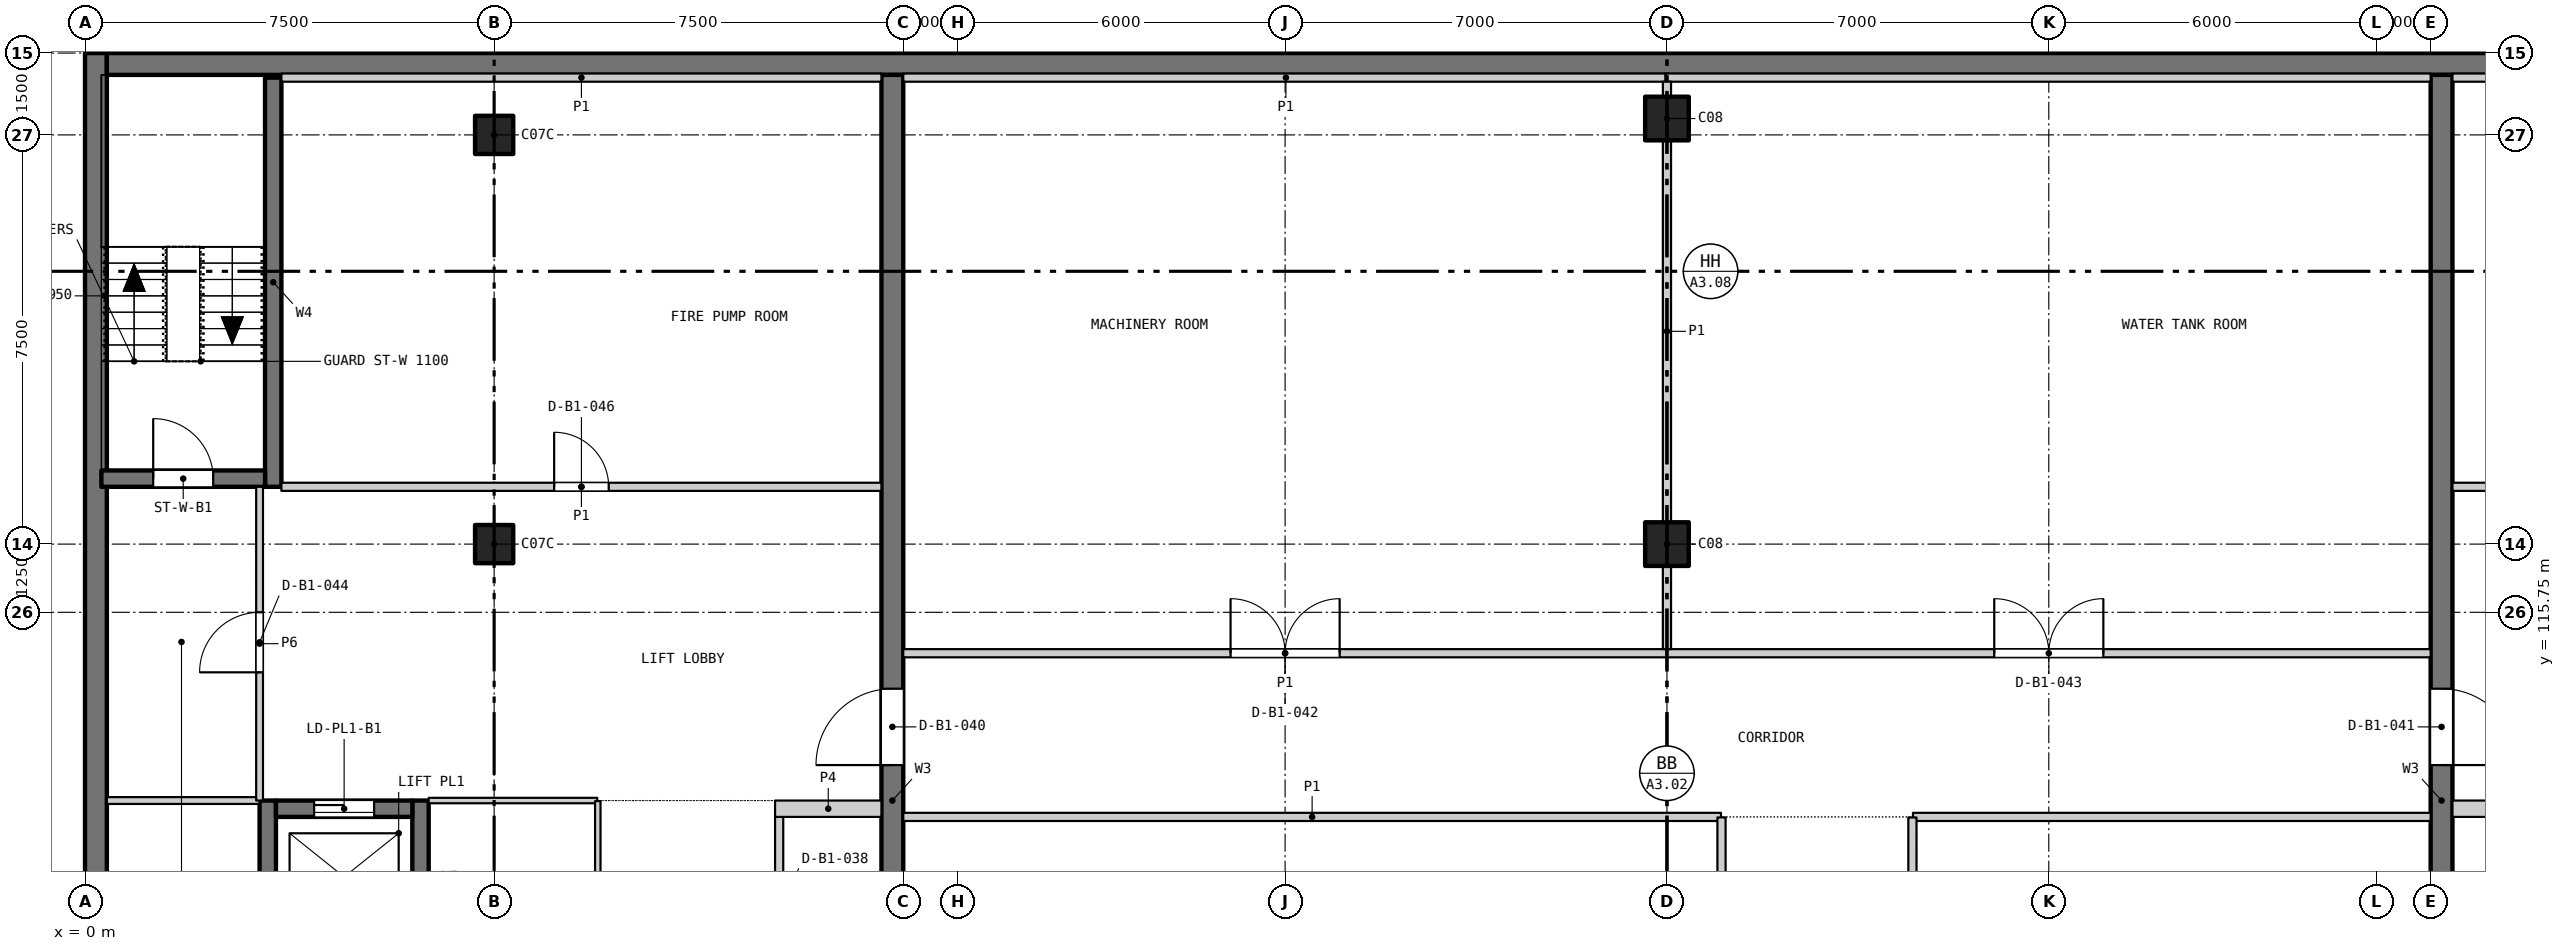
"""IFC4 building model, lengths in metres.
Left out: names, types, materials, properties, quantities, classifications, styles, units other than length and angle.
Written with IfcOpenShell. Run it as: python <this file> out.ifc"""

import sys

from ifc_helpers import new_model, si_unit, direction, frame, frame_2d, origin, origin_2d, place, context, subcontext, project, spatial, rectangle, extrude, element, fill, save


model = new_model("IFC4")
c1 = context("Model", 3, precision=1e-05, world=origin(), true_north=direction((0.0, 1.0)))
c2 = subcontext(c1, "Body", "Model", "MODEL_VIEW")
j1 = project(units=[si_unit("LENGTHUNIT", "METRE"), si_unit("PLANEANGLEUNIT", "RADIAN")], contexts=[c1])
p1 = place(None, origin())
s1 = spatial("IfcSite", under=j1, at=p1, CompositionType="ELEMENT")
p2 = place(p1, origin())
s2 = spatial("IfcBuilding", under=s1, at=p2, CompositionType="ELEMENT")
p3 = place(p2, frame((0.0, 0.0, -10.0)))
s3 = spatial("IfcBuildingStorey", under=s2, at=p3, CompositionType="ELEMENT", Elevation=-10.0)
for number, where, z_axis, x_axis in (
    (1, (7.5, 117.0, -1.4), (0.0, 0.0, 1.0), (1.0, 0.0, 0.0)),
    (2, (7.5, 124.5, -1.4), (0.0, 0.0, 1.0), (1.0, 0.0, 0.0)),
):
    element("IfcColumn", number, at=place(p3, frame(where, z_axis=z_axis, x_axis=x_axis)), inside=s3, PredefinedType="COLUMN", context=c2, shape_type="SweptSolid", body=[
        extrude(rectangle(XDim=0.7, YDim=0.7, at=origin_2d()), origin(), (0.0, 0.0, 1.0), 6.4),
    ])
for number, where, z_axis, x_axis in (
    (3, (29.0, 117.0, -1.4), (0.0, 0.0, 1.0), (1.0, 0.0, 0.0)),
    (4, (29.0, 124.8, -1.4), (0.0, 0.0, 1.0), (1.0, 0.0, 0.0)),
):
    element("IfcColumn", number, at=place(p3, frame(where, z_axis=z_axis, x_axis=x_axis)), inside=s3, PredefinedType="COLUMN", context=c2, shape_type="SweptSolid", body=[
        extrude(rectangle(XDim=0.8, YDim=0.8, at=origin_2d()), origin(), (0.0, 0.0, 1.0), 6.4),
    ])
p4 = place(p3, frame((0.2, 18.0, -1.4), z_axis=(0.0, 0.0, 1.0), x_axis=(0.0, 1.0, 0.0)))
e5 = element("IfcWall", 5, at=p4, inside=s3, PredefinedType="SOLIDWALL", context=c2, shape_type="SweptSolid", body=[
    extrude(rectangle(XDim=108.0, YDim=0.4, at=frame_2d((54.0, 0.0))), origin(), (0.0, 0.0, 1.0), 6.4),
])
p5 = place(p3, frame((0.4, 125.8, -1.4), z_axis=(0.0, 0.0, 1.0), x_axis=(1.0, 0.0, 0.0)))
e6 = element("IfcWall", 6, at=p5, inside=s3, PredefinedType="SOLIDWALL", context=c2, shape_type="SweptSolid", body=[
    extrude(rectangle(XDim=57.2, YDim=0.4, at=frame_2d((28.6, 0.0))), origin(), (0.0, 0.0, 1.0), 6.4),
])
p6 = place(p3, frame((14.8, 99.0, -1.4), z_axis=(0.0, 0.0, 1.0), x_axis=(0.0, 1.0, 0.0)))
e7 = element("IfcWall", 7, at=p6, inside=s3, PredefinedType="SHEAR", context=c2, shape_type="SweptSolid", body=[
    extrude(rectangle(XDim=26.6, YDim=0.4, at=frame_2d((13.3, 0.0))), origin(), (0.0, 0.0, 1.0), 6.4),
])
p7 = place(p6, frame((13.95, 0.0, 1.4)))
e8 = element("IfcOpeningElement", 8, at=p7, cuts=e7, PredefinedType="OPENING", context=c2, shape_type="SweptSolid", body=[
    extrude(rectangle(XDim=1.4, YDim=2.4, at=frame_2d((0.7, 1.2))), frame((0.0, 0.21, 0.0), z_axis=(0.0, -1.0, 0.0), x_axis=(1.0, 0.0, 0.0)), (0.0, 0.0, 1.0), 0.42),
])
p8 = place(p3, frame((43.2, 99.0, -1.4), z_axis=(0.0, 0.0, 1.0), x_axis=(0.0, 1.0, 0.0)))
e9 = element("IfcWall", 9, at=p8, inside=s3, PredefinedType="SHEAR", context=c2, shape_type="SweptSolid", body=[
    extrude(rectangle(XDim=26.6, YDim=0.4, at=frame_2d((13.3, 0.0))), origin(), (0.0, 0.0, 1.0), 6.4),
])
p9 = place(p8, frame((13.95, 0.0, 1.4)))
e10 = element("IfcOpeningElement", 10, at=p9, cuts=e9, PredefinedType="OPENING", context=c2, shape_type="SweptSolid", body=[
    extrude(rectangle(XDim=1.4, YDim=2.4, at=frame_2d((0.7, 1.2))), frame((0.0, 0.21, 0.0), z_axis=(0.0, -1.0, 0.0), x_axis=(1.0, 0.0, 0.0)), (0.0, 0.0, 1.0), 0.42),
])
p10 = place(p3, frame((3.45, 118.05, 0.0), z_axis=(0.0, 0.0, 1.0), x_axis=(0.0, 1.0, 0.0)))
e11 = element("IfcWall", 11, at=p10, inside=s3, PredefinedType="SHEAR", context=c2, shape_type="SweptSolid", body=[
    extrude(rectangle(XDim=7.5, YDim=0.3, at=frame_2d((3.75, 0.0))), origin(), (0.0, 0.0, 1.0), 5.0),
])
p11 = place(p3, frame((0.3, 118.2, 0.0), z_axis=(0.0, 0.0, 1.0), x_axis=(1.0, 0.0, 0.0)))
e12 = element("IfcWall", 12, at=p11, inside=s3, PredefinedType="SHEAR", context=c2, shape_type="SweptSolid", body=[
    extrude(rectangle(XDim=3.0, YDim=0.3, at=frame_2d((1.5, 0.0))), origin(), (0.0, 0.0, 1.0), 5.0),
])
p12 = place(p11, frame((0.95, 0.0, 0.0)))
e13 = element("IfcOpeningElement", 13, at=p12, cuts=e12, PredefinedType="OPENING", context=c2, shape_type="SweptSolid", body=[
    extrude(rectangle(XDim=1.1, YDim=2.1, at=frame_2d((0.55, 1.05))), frame((0.0, 0.16, 0.0), z_axis=(0.0, -1.0, 0.0), x_axis=(1.0, 0.0, 0.0)), (0.0, 0.0, 1.0), 0.32),
])
for number, where, z_axis, x_axis in (
    (14, (3.35, 109.5, -1.4), (0.0, 0.0, 1.0), (0.0, 1.0, 0.0)),
    (15, (6.15, 109.5, -1.4), (0.0, 0.0, 1.0), (0.0, 1.0, 0.0)),
):
    element("IfcWall", number, at=place(p3, frame(where, z_axis=z_axis, x_axis=x_axis)), inside=s3, PredefinedType="SHEAR", context=c2, shape_type="SweptSolid", body=[
        extrude(rectangle(XDim=2.8, YDim=0.3, at=frame_2d((1.4, 0.0))), origin(), (0.0, 0.0, 1.0), 6.4),
    ])
p13 = place(p3, frame((3.5, 112.15, -1.4), z_axis=(0.0, 0.0, 1.0), x_axis=(1.0, 0.0, 0.0)))
e16 = element("IfcWall", 16, at=p13, inside=s3, PredefinedType="SHEAR", context=c2, shape_type="SweptSolid", body=[
    extrude(rectangle(XDim=2.5, YDim=0.3, at=frame_2d((1.25, 0.0))), origin(), (0.0, 0.0, 1.0), 6.4),
])
p14 = place(p13, frame((0.7, 0.0, 1.4)))
e17 = element("IfcOpeningElement", 17, at=p14, cuts=e16, PredefinedType="OPENING", context=c2, shape_type="SweptSolid", body=[
    extrude(rectangle(XDim=1.1, YDim=2.1, at=frame_2d((0.55, 1.05))), frame((0.0, 0.16, 0.0), z_axis=(0.0, -1.0, 0.0), x_axis=(1.0, 0.0, 0.0)), (0.0, 0.0, 1.0), 0.32),
])
p15 = place(p3, frame((12.725, 108.4, 0.0), z_axis=(0.0, 0.0, 1.0), x_axis=(0.0, 1.0, 0.0)))
e18 = element("IfcWall", 18, at=p15, inside=s3, PredefinedType="PARTITIONING", context=c2, shape_type="SweptSolid", body=[
    extrude(rectangle(XDim=3.6, YDim=0.15, at=frame_2d((1.8, 0.0))), origin(), (0.0, 0.0, 1.0), 4.75),
])
p16 = place(p15, frame((1.35, 0.0, 0.0)))
e19 = element("IfcOpeningElement", 19, at=p16, cuts=e18, PredefinedType="OPENING", context=c2, shape_type="SweptSolid", body=[
    extrude(rectangle(XDim=0.9, YDim=2.1, at=frame_2d((0.45, 1.05))), frame((0.0, 0.085, 0.0), z_axis=(0.0, -1.0, 0.0), x_axis=(1.0, 0.0, 0.0)), (0.0, 0.0, 1.0), 0.17),
])
for number, where, z_axis, x_axis in (
    (20, (12.65, 112.15, 0.0), (0.0, 0.0, 1.0), (1.0, 0.0, 0.0)),
    (21, (43.4, 112.15, 0.0), (0.0, 0.0, 1.0), (1.0, 0.0, 0.0)),
):
    element("IfcWall", number, at=place(p3, frame(where, z_axis=z_axis, x_axis=x_axis)), inside=s3, PredefinedType="PARTITIONING", context=c2, shape_type="SweptSolid", body=[
        extrude(rectangle(XDim=1.95, YDim=0.3, at=frame_2d((0.975, 0.0))), origin(), (0.0, 0.0, 1.0), 4.75),
    ])
p17 = place(p3, frame((15.0, 112.0, 0.0), z_axis=(0.0, 0.0, 1.0), x_axis=(1.0, 0.0, 0.0)))
e22 = element("IfcWall", 22, at=p17, inside=s3, PredefinedType="PARTITIONING", context=c2, shape_type="SweptSolid", body=[
    extrude(rectangle(XDim=14.99, YDim=0.15, at=frame_2d((7.495, 0.0))), origin(), (0.0, 0.0, 1.0), 4.75),
])
p18 = place(p3, frame((33.51, 112.0, 0.0), z_axis=(0.0, 0.0, 1.0), x_axis=(1.0, 0.0, 0.0)))
e23 = element("IfcWall", 23, at=p18, inside=s3, PredefinedType="PARTITIONING", context=c2, shape_type="SweptSolid", body=[
    extrude(rectangle(XDim=9.49, YDim=0.15, at=frame_2d((4.745, 0.0))), origin(), (0.0, 0.0, 1.0), 4.75),
])
p19 = place(p3, frame((0.4, 112.3, 0.0), z_axis=(0.0, 0.0, 1.0), x_axis=(1.0, 0.0, 0.0)))
e24 = element("IfcWall", 24, at=p19, inside=s3, PredefinedType="PARTITIONING", context=c2, shape_type="SweptSolid", body=[
    extrude(rectangle(XDim=2.8, YDim=0.125, at=frame_2d((1.4, 0.0))), origin(), (0.0, 0.0, 1.0), 4.75),
])
p20 = place(p3, frame((6.3, 112.3, 0.0), z_axis=(0.0, 0.0, 1.0), x_axis=(1.0, 0.0, 0.0)))
e25 = element("IfcWall", 25, at=p20, inside=s3, PredefinedType="PARTITIONING", context=c2, shape_type="SweptSolid", body=[
    extrude(rectangle(XDim=3.09, YDim=0.1, at=frame_2d((1.545, 0.0))), origin(), (0.0, 0.0, 1.0), 4.75),
])
p21 = place(p3, frame((15.0, 115.0, 0.0), z_axis=(0.0, 0.0, 1.0), x_axis=(1.0, 0.0, 0.0)))
e26 = element("IfcWall", 26, at=p21, inside=s3, PredefinedType="PARTITIONING", context=c2, shape_type="SweptSolid", body=[
    extrude(rectangle(XDim=14.0, YDim=0.15, at=frame_2d((7.0, 0.0))), origin(), (0.0, 0.0, 1.0), 4.75),
])
p22 = place(p21, frame((6.0, 0.0, 0.0)))
e27 = element("IfcOpeningElement", 27, at=p22, cuts=e26, PredefinedType="OPENING", context=c2, shape_type="SweptSolid", body=[
    extrude(rectangle(XDim=2.0, YDim=2.4, at=frame_2d((1.0, 1.2))), frame((0.0, 0.085, 0.0), z_axis=(0.0, -1.0, 0.0), x_axis=(1.0, 0.0, 0.0)), (0.0, 0.0, 1.0), 0.17),
])
p23 = place(p3, frame((29.0, 115.0, 0.0), z_axis=(0.0, 0.0, 1.0), x_axis=(1.0, 0.0, 0.0)))
e28 = element("IfcWall", 28, at=p23, inside=s3, PredefinedType="PARTITIONING", context=c2, shape_type="SweptSolid", body=[
    extrude(rectangle(XDim=14.0, YDim=0.15, at=frame_2d((7.0, 0.0))), origin(), (0.0, 0.0, 1.0), 4.75),
])
p24 = place(p23, frame((6.0, 0.0, 0.0)))
e29 = element("IfcOpeningElement", 29, at=p24, cuts=e28, PredefinedType="OPENING", context=c2, shape_type="SweptSolid", body=[
    extrude(rectangle(XDim=2.0, YDim=2.4, at=frame_2d((1.0, 1.2))), frame((0.0, 0.085, 0.0), z_axis=(0.0, -1.0, 0.0), x_axis=(1.0, 0.0, 0.0)), (0.0, 0.0, 1.0), 0.17),
])
p25 = place(p3, frame((3.6, 118.05, 0.0), z_axis=(0.0, 0.0, 1.0), x_axis=(1.0, 0.0, 0.0)))
e30 = element("IfcWall", 30, at=p25, inside=s3, PredefinedType="PARTITIONING", context=c2, shape_type="SweptSolid", body=[
    extrude(rectangle(XDim=11.0, YDim=0.15, at=frame_2d((5.5, 0.0))), origin(), (0.0, 0.0, 1.0), 4.75),
])
p26 = place(p25, frame((5.0, 0.0, 0.0)))
e31 = element("IfcOpeningElement", 31, at=p26, cuts=e30, PredefinedType="OPENING", context=c2, shape_type="SweptSolid", body=[
    extrude(rectangle(XDim=1.0, YDim=2.1, at=frame_2d((0.5, 1.05))), frame((0.0, 0.085, 0.0), z_axis=(0.0, -1.0, 0.0), x_axis=(1.0, 0.0, 0.0)), (0.0, 0.0, 1.0), 0.17),
])
p27 = place(p3, frame((43.4, 118.05, 0.0), z_axis=(0.0, 0.0, 1.0), x_axis=(1.0, 0.0, 0.0)))
e32 = element("IfcWall", 32, at=p27, inside=s3, PredefinedType="PARTITIONING", context=c2, shape_type="SweptSolid", body=[
    extrude(rectangle(XDim=11.0, YDim=0.15, at=frame_2d((5.5, 0.0))), origin(), (0.0, 0.0, 1.0), 4.75),
])
p28 = place(p27, frame((5.0, 0.0, 0.0)))
e33 = element("IfcOpeningElement", 33, at=p28, cuts=e32, PredefinedType="OPENING", context=c2, shape_type="SweptSolid", body=[
    extrude(rectangle(XDim=1.0, YDim=2.1, at=frame_2d((0.5, 1.05))), frame((0.0, 0.085, 0.0), z_axis=(0.0, -1.0, 0.0), x_axis=(1.0, 0.0, 0.0)), (0.0, 0.0, 1.0), 0.17),
])
p29 = place(p3, frame((3.6, 125.55, 0.0), z_axis=(0.0, 0.0, 1.0), x_axis=(1.0, 0.0, 0.0)))
e34 = element("IfcWall", 34, at=p29, inside=s3, PredefinedType="PARTITIONING", context=c2, shape_type="SweptSolid", body=[
    extrude(rectangle(XDim=11.0, YDim=0.15, at=frame_2d((5.5, 0.0))), origin(), (0.0, 0.0, 1.0), 4.75),
])
for number, where, z_axis, x_axis in (
    (35, (15.0, 125.55, 0.0), (0.0, 0.0, 1.0), (1.0, 0.0, 0.0)),
    (36, (28.97, 125.55, 0.0), (0.0, 0.0, 1.0), (1.0, 0.0, 0.0)),
):
    element("IfcWall", number, at=place(p3, frame(where, z_axis=z_axis, x_axis=x_axis)), inside=s3, PredefinedType="PARTITIONING", context=c2, shape_type="SweptSolid", body=[
        extrude(rectangle(XDim=14.03, YDim=0.15, at=frame_2d((7.015, 0.0))), origin(), (0.0, 0.0, 1.0), 4.75),
    ])
p30 = place(p3, frame((43.4, 125.55, 0.0), z_axis=(0.0, 0.0, 1.0), x_axis=(1.0, 0.0, 0.0)))
e37 = element("IfcWall", 37, at=p30, inside=s3, PredefinedType="PARTITIONING", context=c2, shape_type="SweptSolid", body=[
    extrude(rectangle(XDim=11.0, YDim=0.15, at=frame_2d((5.5, 0.0))), origin(), (0.0, 0.0, 1.0), 4.75),
])
p31 = place(p3, frame((3.2, 112.3, 0.0), z_axis=(0.0, 0.0, 1.0), x_axis=(0.0, 1.0, 0.0)))
e38 = element("IfcWall", 38, at=p31, inside=s3, PredefinedType="PARTITIONING", context=c2, shape_type="SweptSolid", body=[
    extrude(rectangle(XDim=5.75, YDim=0.125, at=frame_2d((2.875, 0.0))), origin(), (0.0, 0.0, 1.0), 4.75),
])
p32 = place(p31, frame((2.35, 0.0, 0.0)))
e39 = element("IfcOpeningElement", 39, at=p32, cuts=e38, PredefinedType="OPENING", context=c2, shape_type="SweptSolid", body=[
    extrude(rectangle(XDim=1.1, YDim=2.1, at=frame_2d((0.55, 1.05))), frame((0.0, 0.073, 0.0), z_axis=(0.0, -1.0, 0.0), x_axis=(1.0, 0.0, 0.0)), (0.0, 0.0, 1.0), 0.145),
])
p33 = place(p3, frame((9.4, 108.975, 0.0), z_axis=(0.0, 0.0, 1.0), x_axis=(0.0, 1.0, 0.0)))
e40 = element("IfcWall", 40, at=p33, inside=s3, PredefinedType="PARTITIONING", context=c2, shape_type="SweptSolid", body=[
    extrude(rectangle(XDim=3.315, YDim=0.1, at=frame_2d((1.657, 0.0))), origin(), (0.0, 0.0, 1.0), 4.75),
])
p34 = place(p3, frame((29.0, 115.075, 0.0), z_axis=(0.0, 0.0, 1.0), x_axis=(0.0, 1.0, 0.0)))
e41 = element("IfcWall", 41, at=p34, inside=s3, PredefinedType="PARTITIONING", context=c2, shape_type="SweptSolid", body=[
    extrude(rectangle(XDim=1.525, YDim=0.15, at=frame_2d((0.763, 0.0))), origin(), (0.0, 0.0, 1.0), 3.65),
])
p35 = place(p3, frame((29.0, 117.4, 0.0), z_axis=(0.0, 0.0, 1.0), x_axis=(0.0, 1.0, 0.0)))
e42 = element("IfcWall", 42, at=p35, inside=s3, PredefinedType="PARTITIONING", context=c2, shape_type="SweptSolid", body=[
    extrude(rectangle(XDim=7.0, YDim=0.15, at=frame_2d((3.5, 0.0))), origin(), (0.0, 0.0, 1.0), 3.65),
])
p36 = place(p3, frame((29.0, 125.2, 0.0), z_axis=(0.0, 0.0, 1.0), x_axis=(0.0, 1.0, 0.0)))
e43 = element("IfcWall", 43, at=p36, inside=s3, PredefinedType="PARTITIONING", context=c2, shape_type="SweptSolid", body=[
    extrude(rectangle(XDim=0.275, YDim=0.15, at=frame_2d((0.138, 0.0))), origin(), (0.0, 0.0, 1.0), 4.75),
])
p37 = place(p3, frame((30.0, 99.0, 0.0), z_axis=(0.0, 0.0, 1.0), x_axis=(0.0, 1.0, 0.0)))
e44 = element("IfcWall", 44, at=p37, inside=s3, PredefinedType="PARTITIONING", context=c2, shape_type="SweptSolid", body=[
    extrude(rectangle(XDim=12.99, YDim=0.15, at=frame_2d((6.495, 0.0))), origin(), (0.0, 0.0, 1.0), 4.75),
])
p38 = place(p37, frame((5.5, 0.0, 0.0)))
e45 = element("IfcOpeningElement", 45, at=p38, cuts=e44, PredefinedType="OPENING", context=c2, shape_type="SweptSolid", body=[
    extrude(rectangle(XDim=2.0, YDim=2.4, at=frame_2d((1.0, 1.2))), frame((0.0, 0.085, 0.0), z_axis=(0.0, -1.0, 0.0), x_axis=(1.0, 0.0, 0.0)), (0.0, 0.0, 1.0), 0.17),
])
p39 = place(p3, frame((33.5, 99.0, 0.0), z_axis=(0.0, 0.0, 1.0), x_axis=(0.0, 1.0, 0.0)))
e46 = element("IfcWall", 46, at=p39, inside=s3, PredefinedType="PARTITIONING", context=c2, shape_type="SweptSolid", body=[
    extrude(rectangle(XDim=12.99, YDim=0.15, at=frame_2d((6.495, 0.0))), origin(), (0.0, 0.0, 1.0), 4.75),
])
p40 = place(p39, frame((5.5, 0.0, 0.0)))
e47 = element("IfcOpeningElement", 47, at=p40, cuts=e46, PredefinedType="OPENING", context=c2, shape_type="SweptSolid", body=[
    extrude(rectangle(XDim=2.0, YDim=2.4, at=frame_2d((1.0, 1.2))), frame((0.0, 0.085, 0.0), z_axis=(0.0, -1.0, 0.0), x_axis=(1.0, 0.0, 0.0)), (0.0, 0.0, 1.0), 0.17),
])
p41 = place(p7, origin())
e48 = element("IfcDoor", 48, at=p41, inside=s3, OperationType="SINGLE_SWING_LEFT", PredefinedType="DOOR", context=c2, shape_type="SweptSolid", body=[
    extrude(rectangle(XDim=1.4, YDim=2.4, at=frame_2d((0.7, 1.2))), frame((0.0, 0.025, 0.0), z_axis=(0.0, -1.0, 0.0), x_axis=(1.0, 0.0, 0.0)), (0.0, 0.0, 1.0), 0.05),
])
fill(e8, e48)
p42 = place(p9, frame((1.4, 0.0, 0.0), z_axis=(0.0, 0.0, 1.0), x_axis=(-1.0, 0.0, 0.0)))
e49 = element("IfcDoor", 49, at=p42, inside=s3, OperationType="SINGLE_SWING_RIGHT", PredefinedType="DOOR", context=c2, shape_type="SweptSolid", body=[
    extrude(rectangle(XDim=1.4, YDim=2.4, at=frame_2d((0.7, 1.2))), frame((0.0, 0.025, 0.0), z_axis=(0.0, -1.0, 0.0), x_axis=(1.0, 0.0, 0.0)), (0.0, 0.0, 1.0), 0.05),
])
fill(e10, e49)
p43 = place(p22, origin())
e50 = element("IfcDoor", 50, at=p43, inside=s3, OperationType="DOUBLE_DOOR_SINGLE_SWING", PredefinedType="DOOR", context=c2, shape_type="SweptSolid", body=[
    extrude(rectangle(XDim=2.0, YDim=2.4, at=frame_2d((1.0, 1.2))), frame((0.0, 0.025, 0.0), z_axis=(0.0, -1.0, 0.0), x_axis=(1.0, 0.0, 0.0)), (0.0, 0.0, 1.0), 0.05),
])
fill(e27, e50)
p44 = place(p24, origin())
e51 = element("IfcDoor", 51, at=p44, inside=s3, OperationType="DOUBLE_DOOR_SINGLE_SWING", PredefinedType="DOOR", context=c2, shape_type="SweptSolid", body=[
    extrude(rectangle(XDim=2.0, YDim=2.4, at=frame_2d((1.0, 1.2))), frame((0.0, 0.025, 0.0), z_axis=(0.0, -1.0, 0.0), x_axis=(1.0, 0.0, 0.0)), (0.0, 0.0, 1.0), 0.05),
])
fill(e29, e51)
p45 = place(p32, origin())
e52 = element("IfcDoor", 52, at=p45, inside=s3, OperationType="SINGLE_SWING_LEFT", PredefinedType="DOOR", context=c2, shape_type="SweptSolid", body=[
    extrude(rectangle(XDim=1.1, YDim=2.1, at=frame_2d((0.55, 1.05))), frame((0.0, 0.025, 0.0), z_axis=(0.0, -1.0, 0.0), x_axis=(1.0, 0.0, 0.0)), (0.0, 0.0, 1.0), 0.05),
])
fill(e39, e52)
p46 = place(p26, origin())
e53 = element("IfcDoor", 53, at=p46, inside=s3, OperationType="SINGLE_SWING_LEFT", PredefinedType="DOOR", context=c2, shape_type="SweptSolid", body=[
    extrude(rectangle(XDim=1.0, YDim=2.1, at=frame_2d((0.5, 1.05))), frame((0.0, 0.025, 0.0), z_axis=(0.0, -1.0, 0.0), x_axis=(1.0, 0.0, 0.0)), (0.0, 0.0, 1.0), 0.05),
])
fill(e31, e53)
p47 = place(p12, origin())
e54 = element("IfcDoor", 54, at=p47, inside=s3, OperationType="SINGLE_SWING_LEFT", PredefinedType="DOOR", context=c2, shape_type="SweptSolid", body=[
    extrude(rectangle(XDim=1.1, YDim=2.1, at=frame_2d((0.55, 1.05))), frame((0.0, 0.025, 0.0), z_axis=(0.0, -1.0, 0.0), x_axis=(1.0, 0.0, 0.0)), (0.0, 0.0, 1.0), 0.05),
])
fill(e13, e54)
p48 = place(p14, origin())
e55 = element("IfcDoor", 55, at=p48, inside=s3, OperationType="SLIDING_TO_LEFT", PredefinedType="DOOR", context=c2, shape_type="SweptSolid", body=[
    extrude(rectangle(XDim=1.1, YDim=2.1, at=frame_2d((0.55, 1.05))), frame((0.0, 0.025, 0.0), z_axis=(0.0, -1.0, 0.0), x_axis=(1.0, 0.0, 0.0)), (0.0, 0.0, 1.0), 0.05),
])
fill(e17, e55)
save(model, sys.argv[1])
